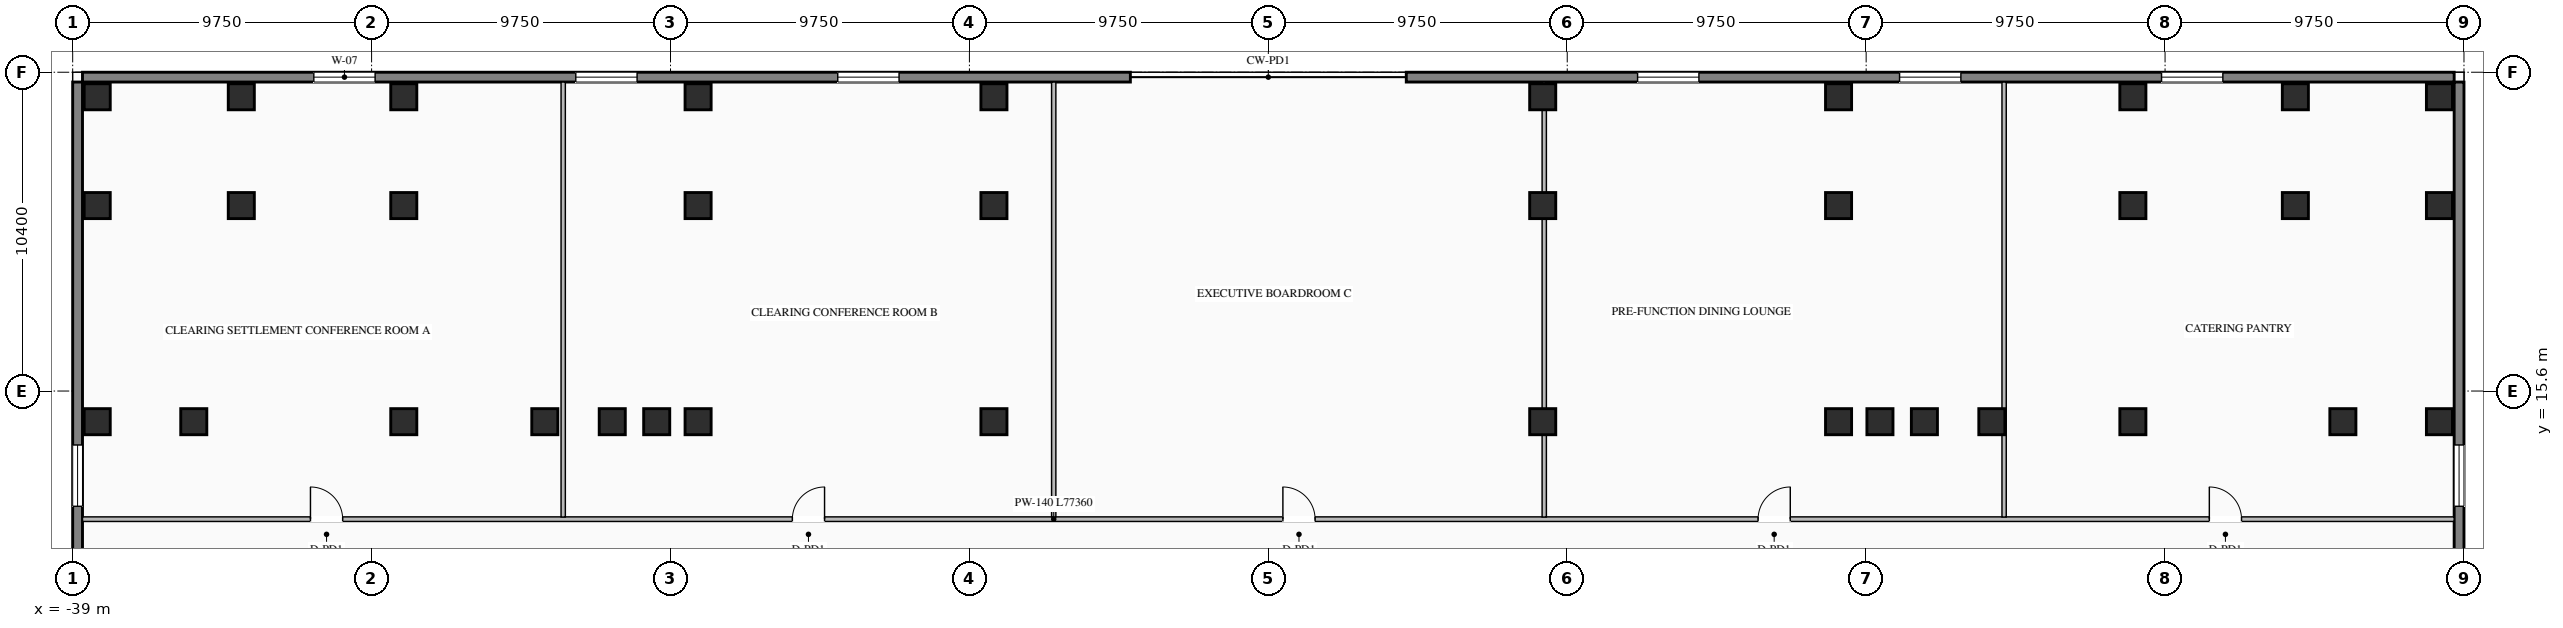
"""IFC4 building model, lengths in metres.
Left out: names, types, materials, properties, quantities, classifications, styles, units other than length and angle.
Written with IfcOpenShell. Run it as: python <this file> out.ifc"""

import sys

from ifc_helpers import new_model, si_unit, direction, frame, frame_2d, origin, origin_2d, place, context, subcontext, project, spatial, rectangle, i_section, extrude, element, fill, save


model = new_model("IFC4")
c1 = context("Model", 3, precision=1e-05, world=origin(), true_north=direction((0.0, 1.0)))
c2 = subcontext(c1, "Body", "Model", "MODEL_VIEW")
j1 = project(units=[si_unit("LENGTHUNIT", "METRE"), si_unit("PLANEANGLEUNIT", "RADIAN")], contexts=[c1])
p1 = place(None, origin())
s1 = spatial("IfcSite", under=j1, at=p1, CompositionType="ELEMENT")
p2 = place(p1, origin())
s2 = spatial("IfcBuilding", under=s1, at=p2, CompositionType="ELEMENT")
p3 = place(p2, frame((0.0, 0.0, 18.6)))
s3 = spatial("IfcBuildingStorey", under=s2, at=p3, CompositionType="ELEMENT", Elevation=18.6)
for number, where, z_axis, x_axis in (
    (1, (-21.4, 14.6, 0.0), (0.0, 0.0, 1.0), (1.0, 0.0, 0.0)),
    (2, (-19.95, 14.6, 0.0), (0.0, 0.0, 1.0), (1.0, 0.0, 0.0)),
    (3, (-18.6, 14.6, 0.0), (0.0, 0.0, 1.0), (1.0, 0.0, 0.0)),
    (4, (-8.95, 14.6, 0.0), (0.0, 0.0, 1.0), (1.0, 0.0, 0.0)),
    (5, (8.95, 14.6, 0.0), (0.0, 0.0, 1.0), (1.0, 0.0, 0.0)),
    (6, (18.6, 14.6, 0.0), (0.0, 0.0, 1.0), (1.0, 0.0, 0.0)),
    (7, (19.95, 14.6, 0.0), (0.0, 0.0, 1.0), (1.0, 0.0, 0.0)),
    (8, (21.4, 14.6, 0.0), (0.0, 0.0, 1.0), (1.0, 0.0, 0.0)),
    (9, (-23.6, 14.6, 0.0), (0.0, 0.0, 1.0), (1.0, 0.0, 0.0)),
    (10, (23.6, 14.6, 0.0), (0.0, 0.0, 1.0), (1.0, 0.0, 0.0)),
    (11, (-28.2, 14.6, 0.0), (0.0, 0.0, 1.0), (1.0, 0.0, 0.0)),
    (12, (28.2, 14.6, 0.0), (0.0, 0.0, 1.0), (1.0, 0.0, 0.0)),
    (13, (-35.05, 14.6, 0.0), (0.0, 0.0, 1.0), (1.0, 0.0, 0.0)),
    (14, (35.05, 14.6, 0.0), (0.0, 0.0, 1.0), (1.0, 0.0, 0.0)),
    (15, (-38.2, 21.65, 0.0), (0.0, 0.0, 1.0), (1.0, 0.0, 0.0)),
    (16, (-33.5, 21.65, 0.0), (0.0, 0.0, 1.0), (1.0, 0.0, 0.0)),
    (17, (-28.2, 21.65, 0.0), (0.0, 0.0, 1.0), (1.0, 0.0, 0.0)),
    (18, (-18.6, 21.65, 0.0), (0.0, 0.0, 1.0), (1.0, 0.0, 0.0)),
    (19, (-8.95, 21.65, 0.0), (0.0, 0.0, 1.0), (1.0, 0.0, 0.0)),
    (20, (8.95, 21.65, 0.0), (0.0, 0.0, 1.0), (1.0, 0.0, 0.0)),
    (21, (18.6, 21.65, 0.0), (0.0, 0.0, 1.0), (1.0, 0.0, 0.0)),
    (22, (28.2, 21.65, 0.0), (0.0, 0.0, 1.0), (1.0, 0.0, 0.0)),
    (23, (33.5, 21.65, 0.0), (0.0, 0.0, 1.0), (1.0, 0.0, 0.0)),
    (24, (38.2, 21.65, 0.0), (0.0, 0.0, 1.0), (1.0, 0.0, 0.0)),
    (25, (-38.2, 25.2, 0.0), (0.0, 0.0, 1.0), (1.0, 0.0, 0.0)),
    (26, (-33.5, 25.2, 0.0), (0.0, 0.0, 1.0), (1.0, 0.0, 0.0)),
    (27, (-28.2, 25.2, 0.0), (0.0, 0.0, 1.0), (1.0, 0.0, 0.0)),
    (28, (-18.6, 25.2, 0.0), (0.0, 0.0, 1.0), (1.0, 0.0, 0.0)),
    (29, (-8.95, 25.2, 0.0), (0.0, 0.0, 1.0), (1.0, 0.0, 0.0)),
    (30, (8.95, 25.2, 0.0), (0.0, 0.0, 1.0), (1.0, 0.0, 0.0)),
    (31, (18.6, 25.2, 0.0), (0.0, 0.0, 1.0), (1.0, 0.0, 0.0)),
    (32, (28.2, 25.2, 0.0), (0.0, 0.0, 1.0), (1.0, 0.0, 0.0)),
    (33, (33.5, 25.2, 0.0), (0.0, 0.0, 1.0), (1.0, 0.0, 0.0)),
    (34, (38.2, 25.2, 0.0), (0.0, 0.0, 1.0), (1.0, 0.0, 0.0)),
    (35, (-38.2, 14.6, 0.0), (0.0, 0.0, 1.0), (1.0, 0.0, 0.0)),
    (36, (38.2, 14.6, 0.0), (0.0, 0.0, 1.0), (1.0, 0.0, 0.0)),
):
    element("IfcColumn", number, at=place(p3, frame(where, z_axis=z_axis, x_axis=x_axis)), inside=s3, PredefinedType="COLUMN", context=c2, shape_type="SweptSolid", body=[
        extrude(i_section(OverallWidth=0.85, OverallDepth=0.85, WebThickness=0.032, FlangeThickness=0.048, at=origin_2d()), origin(), (0.0, 0.0, 1.0), 4.2),
    ])
p4 = place(p3, frame((-38.68, 25.84, 0.0), z_axis=(0.0, 0.0, 1.0), x_axis=(1.0, 0.0, 0.0)))
e37 = element("IfcWall", 37, at=p4, inside=s3, PredefinedType="STANDARD", context=c2, shape_type="SweptSolid", body=[
    extrude(rectangle(XDim=34.18, YDim=0.32, at=frame_2d((17.09, 0.0))), origin(), (0.0, 0.0, 1.0), 3.93),
])
p5 = place(p4, frame((7.545, 0.0, 0.8)))
e38 = element("IfcOpeningElement", 38, at=p5, cuts=e37, PredefinedType="OPENING", context=c2, shape_type="SweptSolid", body=[
    extrude(rectangle(XDim=2.0, YDim=2.2, at=frame_2d((1.0, 1.1))), frame((0.0, 0.17, 0.0), z_axis=(0.0, -1.0, 0.0), x_axis=(1.0, 0.0, 0.0)), (0.0, 0.0, 1.0), 0.34),
])
p6 = place(p4, frame((16.09, 0.0, 0.8)))
e39 = element("IfcOpeningElement", 39, at=p6, cuts=e37, PredefinedType="OPENING", context=c2, shape_type="SweptSolid", body=[
    extrude(rectangle(XDim=2.0, YDim=2.2, at=frame_2d((1.0, 1.1))), frame((0.0, 0.17, 0.0), z_axis=(0.0, -1.0, 0.0), x_axis=(1.0, 0.0, 0.0)), (0.0, 0.0, 1.0), 0.34),
])
p7 = place(p4, frame((24.635, 0.0, 0.8)))
e40 = element("IfcOpeningElement", 40, at=p7, cuts=e37, PredefinedType="OPENING", context=c2, shape_type="SweptSolid", body=[
    extrude(rectangle(XDim=2.0, YDim=2.2, at=frame_2d((1.0, 1.1))), frame((0.0, 0.17, 0.0), z_axis=(0.0, -1.0, 0.0), x_axis=(1.0, 0.0, 0.0)), (0.0, 0.0, 1.0), 0.34),
])
p8 = place(p3, frame((4.5, 25.84, 0.0), z_axis=(0.0, 0.0, 1.0), x_axis=(1.0, 0.0, 0.0)))
e41 = element("IfcWall", 41, at=p8, inside=s3, PredefinedType="STANDARD", context=c2, shape_type="SweptSolid", body=[
    extrude(rectangle(XDim=34.18, YDim=0.32, at=frame_2d((17.09, 0.0))), origin(), (0.0, 0.0, 1.0), 3.93),
])
p9 = place(p8, frame((7.545, 0.0, 0.8)))
e42 = element("IfcOpeningElement", 42, at=p9, cuts=e41, PredefinedType="OPENING", context=c2, shape_type="SweptSolid", body=[
    extrude(rectangle(XDim=2.0, YDim=2.2, at=frame_2d((1.0, 1.1))), frame((0.0, 0.17, 0.0), z_axis=(0.0, -1.0, 0.0), x_axis=(1.0, 0.0, 0.0)), (0.0, 0.0, 1.0), 0.34),
])
p10 = place(p8, frame((16.09, 0.0, 0.8)))
e43 = element("IfcOpeningElement", 43, at=p10, cuts=e41, PredefinedType="OPENING", context=c2, shape_type="SweptSolid", body=[
    extrude(rectangle(XDim=2.0, YDim=2.2, at=frame_2d((1.0, 1.1))), frame((0.0, 0.17, 0.0), z_axis=(0.0, -1.0, 0.0), x_axis=(1.0, 0.0, 0.0)), (0.0, 0.0, 1.0), 0.34),
])
p11 = place(p8, frame((24.635, 0.0, 0.8)))
e44 = element("IfcOpeningElement", 44, at=p11, cuts=e41, PredefinedType="OPENING", context=c2, shape_type="SweptSolid", body=[
    extrude(rectangle(XDim=2.0, YDim=2.2, at=frame_2d((1.0, 1.1))), frame((0.0, 0.17, 0.0), z_axis=(0.0, -1.0, 0.0), x_axis=(1.0, 0.0, 0.0)), (0.0, 0.0, 1.0), 0.34),
])
p12 = place(p3, frame((-38.84, -25.68, 0.0), z_axis=(0.0, 0.0, 1.0), x_axis=(0.0, 1.0, 0.0)))
e45 = element("IfcWall", 45, at=p12, inside=s3, PredefinedType="STANDARD", context=c2, shape_type="SweptSolid", body=[
    extrude(rectangle(XDim=51.36, YDim=0.32, at=frame_2d((25.68, 0.0))), origin(), (0.0, 0.0, 1.0), 3.93),
])
p13 = place(p12, frame((11.84, 0.0, 0.8)))
e46 = element("IfcOpeningElement", 46, at=p13, cuts=e45, PredefinedType="OPENING", context=c2, shape_type="SweptSolid", body=[
    extrude(rectangle(XDim=2.0, YDim=2.2, at=frame_2d((1.0, 1.1))), frame((0.0, 0.17, 0.0), z_axis=(0.0, -1.0, 0.0), x_axis=(1.0, 0.0, 0.0)), (0.0, 0.0, 1.0), 0.34),
])
p14 = place(p12, frame((24.68, 0.0, 0.8)))
e47 = element("IfcOpeningElement", 47, at=p14, cuts=e45, PredefinedType="OPENING", context=c2, shape_type="SweptSolid", body=[
    extrude(rectangle(XDim=2.0, YDim=2.2, at=frame_2d((1.0, 1.1))), frame((0.0, 0.17, 0.0), z_axis=(0.0, -1.0, 0.0), x_axis=(1.0, 0.0, 0.0)), (0.0, 0.0, 1.0), 0.34),
])
p15 = place(p12, frame((37.52, 0.0, 0.8)))
e48 = element("IfcOpeningElement", 48, at=p15, cuts=e45, PredefinedType="OPENING", context=c2, shape_type="SweptSolid", body=[
    extrude(rectangle(XDim=2.0, YDim=2.2, at=frame_2d((1.0, 1.1))), frame((0.0, 0.17, 0.0), z_axis=(0.0, -1.0, 0.0), x_axis=(1.0, 0.0, 0.0)), (0.0, 0.0, 1.0), 0.34),
])
p16 = place(p3, frame((38.84, 25.68, 0.0), z_axis=(0.0, 0.0, 1.0), x_axis=(0.0, -1.0, 0.0)))
e49 = element("IfcWall", 49, at=p16, inside=s3, PredefinedType="STANDARD", context=c2, shape_type="SweptSolid", body=[
    extrude(rectangle(XDim=51.36, YDim=0.32, at=frame_2d((25.68, 0.0))), origin(), (0.0, 0.0, 1.0), 3.93),
])
p17 = place(p16, frame((11.84, 0.0, 0.8)))
e50 = element("IfcOpeningElement", 50, at=p17, cuts=e49, PredefinedType="OPENING", context=c2, shape_type="SweptSolid", body=[
    extrude(rectangle(XDim=2.0, YDim=2.2, at=frame_2d((1.0, 1.1))), frame((0.0, 0.17, 0.0), z_axis=(0.0, -1.0, 0.0), x_axis=(1.0, 0.0, 0.0)), (0.0, 0.0, 1.0), 0.34),
])
p18 = place(p16, frame((24.68, 0.0, 0.8)))
e51 = element("IfcOpeningElement", 51, at=p18, cuts=e49, PredefinedType="OPENING", context=c2, shape_type="SweptSolid", body=[
    extrude(rectangle(XDim=2.0, YDim=2.2, at=frame_2d((1.0, 1.1))), frame((0.0, 0.17, 0.0), z_axis=(0.0, -1.0, 0.0), x_axis=(1.0, 0.0, 0.0)), (0.0, 0.0, 1.0), 0.34),
])
p19 = place(p16, frame((37.52, 0.0, 0.8)))
e52 = element("IfcOpeningElement", 52, at=p19, cuts=e49, PredefinedType="OPENING", context=c2, shape_type="SweptSolid", body=[
    extrude(rectangle(XDim=2.0, YDim=2.2, at=frame_2d((1.0, 1.1))), frame((0.0, 0.17, 0.0), z_axis=(0.0, -1.0, 0.0), x_axis=(1.0, 0.0, 0.0)), (0.0, 0.0, 1.0), 0.34),
])
p20 = place(p3, frame((-38.68, 11.42, 0.0), z_axis=(0.0, 0.0, 1.0), x_axis=(1.0, 0.0, 0.0)))
e53 = element("IfcWall", 53, at=p20, inside=s3, PredefinedType="STANDARD", context=c2, shape_type="SweptSolid", body=[
    extrude(rectangle(XDim=77.36, YDim=0.15, at=frame_2d((38.68, 0.0))), origin(), (0.0, 0.0, 1.0), 3.93),
])
p21 = place(p20, frame((7.436, 0.0, 0.0)))
e54 = element("IfcOpeningElement", 54, at=p21, cuts=e53, PredefinedType="OPENING", context=c2, shape_type="SweptSolid", body=[
    extrude(rectangle(XDim=1.05, YDim=2.08, at=frame_2d((0.525, 1.04))), frame((0.0, 0.085, 0.0), z_axis=(0.0, -1.0, 0.0), x_axis=(1.0, 0.0, 0.0)), (0.0, 0.0, 1.0), 0.17),
])
p22 = place(p20, frame((23.155, 0.0, 0.0)))
e55 = element("IfcOpeningElement", 55, at=p22, cuts=e53, PredefinedType="OPENING", context=c2, shape_type="SweptSolid", body=[
    extrude(rectangle(XDim=1.05, YDim=2.08, at=frame_2d((0.525, 1.04))), frame((0.0, 0.085, 0.0), z_axis=(0.0, -1.0, 0.0), x_axis=(1.0, 0.0, 0.0)), (0.0, 0.0, 1.0), 0.17),
])
p23 = place(p20, frame((39.155, 0.0, 0.0)))
e56 = element("IfcOpeningElement", 56, at=p23, cuts=e53, PredefinedType="OPENING", context=c2, shape_type="SweptSolid", body=[
    extrude(rectangle(XDim=1.05, YDim=2.08, at=frame_2d((0.525, 1.04))), frame((0.0, 0.085, 0.0), z_axis=(0.0, -1.0, 0.0), x_axis=(1.0, 0.0, 0.0)), (0.0, 0.0, 1.0), 0.17),
])
p24 = place(p20, frame((54.655, 0.0, 0.0)))
e57 = element("IfcOpeningElement", 57, at=p24, cuts=e53, PredefinedType="OPENING", context=c2, shape_type="SweptSolid", body=[
    extrude(rectangle(XDim=1.05, YDim=2.08, at=frame_2d((0.525, 1.04))), frame((0.0, 0.085, 0.0), z_axis=(0.0, -1.0, 0.0), x_axis=(1.0, 0.0, 0.0)), (0.0, 0.0, 1.0), 0.17),
])
p25 = place(p20, frame((69.374, 0.0, 0.0)))
e58 = element("IfcOpeningElement", 58, at=p25, cuts=e53, PredefinedType="OPENING", context=c2, shape_type="SweptSolid", body=[
    extrude(rectangle(XDim=1.05, YDim=2.08, at=frame_2d((0.525, 1.04))), frame((0.0, 0.085, 0.0), z_axis=(0.0, -1.0, 0.0), x_axis=(1.0, 0.0, 0.0)), (0.0, 0.0, 1.0), 0.17),
])
for number, where, z_axis, x_axis in (
    (59, (-23.0, 11.49, 0.0), (0.0, 0.0, 1.0), (0.0, 1.0, 0.0)),
    (60, (-7.0, 11.49, 0.0), (0.0, 0.0, 1.0), (0.0, 1.0, 0.0)),
):
    element("IfcWall", number, at=place(p3, frame(where, z_axis=z_axis, x_axis=x_axis)), inside=s3, PredefinedType="STANDARD", context=c2, shape_type="SweptSolid", body=[
        extrude(rectangle(XDim=14.19, YDim=0.14, at=frame_2d((7.095, 0.0))), origin(), (0.0, 0.0, 1.0), 3.93),
    ])
p26 = place(p3, frame((9.0, 11.49, 0.0), z_axis=(0.0, 0.0, 1.0), x_axis=(0.0, 1.0, 0.0)))
e61 = element("IfcWall", 61, at=p26, inside=s3, PredefinedType="STANDARD", context=c2, shape_type="SweptSolid", body=[
    extrude(rectangle(XDim=14.19, YDim=0.14, at=frame_2d((7.095, 0.0))), origin(), (0.0, 0.0, 1.0), 3.225),
])
p27 = place(p3, frame((24.0, 11.49, 0.0), z_axis=(0.0, 0.0, 1.0), x_axis=(0.0, 1.0, 0.0)))
e62 = element("IfcWall", 62, at=p27, inside=s3, PredefinedType="STANDARD", context=c2, shape_type="SweptSolid", body=[
    extrude(rectangle(XDim=14.19, YDim=0.14, at=frame_2d((7.095, 0.0))), origin(), (0.0, 0.0, 1.0), 3.93),
])
p28 = place(p5, origin())
e63 = element("IfcWindow", 63, at=p28, inside=s3, PartitioningType="DOUBLE_PANEL_VERTICAL", PredefinedType="WINDOW", context=c2, shape_type="SweptSolid", body=[
    extrude(rectangle(XDim=2.0, YDim=2.2, at=frame_2d((1.0, 1.1))), frame((0.0, 0.03, 0.0), z_axis=(0.0, -1.0, 0.0), x_axis=(1.0, 0.0, 0.0)), (0.0, 0.0, 1.0), 0.06),
])
fill(e38, e63)
p29 = place(p6, origin())
e64 = element("IfcWindow", 64, at=p29, inside=s3, PartitioningType="DOUBLE_PANEL_VERTICAL", PredefinedType="WINDOW", context=c2, shape_type="SweptSolid", body=[
    extrude(rectangle(XDim=2.0, YDim=2.2, at=frame_2d((1.0, 1.1))), frame((0.0, 0.03, 0.0), z_axis=(0.0, -1.0, 0.0), x_axis=(1.0, 0.0, 0.0)), (0.0, 0.0, 1.0), 0.06),
])
fill(e39, e64)
p30 = place(p7, origin())
e65 = element("IfcWindow", 65, at=p30, inside=s3, PartitioningType="DOUBLE_PANEL_VERTICAL", PredefinedType="WINDOW", context=c2, shape_type="SweptSolid", body=[
    extrude(rectangle(XDim=2.0, YDim=2.2, at=frame_2d((1.0, 1.1))), frame((0.0, 0.03, 0.0), z_axis=(0.0, -1.0, 0.0), x_axis=(1.0, 0.0, 0.0)), (0.0, 0.0, 1.0), 0.06),
])
fill(e40, e65)
p31 = place(p9, origin())
e66 = element("IfcWindow", 66, at=p31, inside=s3, PartitioningType="DOUBLE_PANEL_VERTICAL", PredefinedType="WINDOW", context=c2, shape_type="SweptSolid", body=[
    extrude(rectangle(XDim=2.0, YDim=2.2, at=frame_2d((1.0, 1.1))), frame((0.0, 0.03, 0.0), z_axis=(0.0, -1.0, 0.0), x_axis=(1.0, 0.0, 0.0)), (0.0, 0.0, 1.0), 0.06),
])
fill(e42, e66)
p32 = place(p10, origin())
e67 = element("IfcWindow", 67, at=p32, inside=s3, PartitioningType="DOUBLE_PANEL_VERTICAL", PredefinedType="WINDOW", context=c2, shape_type="SweptSolid", body=[
    extrude(rectangle(XDim=2.0, YDim=2.2, at=frame_2d((1.0, 1.1))), frame((0.0, 0.03, 0.0), z_axis=(0.0, -1.0, 0.0), x_axis=(1.0, 0.0, 0.0)), (0.0, 0.0, 1.0), 0.06),
])
fill(e43, e67)
p33 = place(p11, origin())
e68 = element("IfcWindow", 68, at=p33, inside=s3, PartitioningType="DOUBLE_PANEL_VERTICAL", PredefinedType="WINDOW", context=c2, shape_type="SweptSolid", body=[
    extrude(rectangle(XDim=2.0, YDim=2.2, at=frame_2d((1.0, 1.1))), frame((0.0, 0.03, 0.0), z_axis=(0.0, -1.0, 0.0), x_axis=(1.0, 0.0, 0.0)), (0.0, 0.0, 1.0), 0.06),
])
fill(e44, e68)
p34 = place(p15, origin())
e69 = element("IfcWindow", 69, at=p34, inside=s3, PartitioningType="DOUBLE_PANEL_VERTICAL", PredefinedType="WINDOW", context=c2, shape_type="SweptSolid", body=[
    extrude(rectangle(XDim=2.0, YDim=2.2, at=frame_2d((1.0, 1.1))), frame((0.0, 0.03, 0.0), z_axis=(0.0, -1.0, 0.0), x_axis=(1.0, 0.0, 0.0)), (0.0, 0.0, 1.0), 0.06),
])
fill(e48, e69)
p35 = place(p17, origin())
e70 = element("IfcWindow", 70, at=p35, inside=s3, PartitioningType="DOUBLE_PANEL_VERTICAL", PredefinedType="WINDOW", context=c2, shape_type="SweptSolid", body=[
    extrude(rectangle(XDim=2.0, YDim=2.2, at=frame_2d((1.0, 1.1))), frame((0.0, 0.03, 0.0), z_axis=(0.0, -1.0, 0.0), x_axis=(1.0, 0.0, 0.0)), (0.0, 0.0, 1.0), 0.06),
])
fill(e50, e70)
p36 = place(p21, origin())
e71 = element("IfcDoor", 71, at=p36, inside=s3, OperationType="SINGLE_SWING_LEFT", PredefinedType="DOOR", context=c2, shape_type="SweptSolid", body=[
    extrude(rectangle(XDim=1.05, YDim=2.08, at=frame_2d((0.525, 1.04))), frame((0.0, 0.025, 0.0), z_axis=(0.0, -1.0, 0.0), x_axis=(1.0, 0.0, 0.0)), (0.0, 0.0, 1.0), 0.05),
])
fill(e54, e71)
p37 = place(p22, origin())
e72 = element("IfcDoor", 72, at=p37, inside=s3, OperationType="SINGLE_SWING_RIGHT", PredefinedType="DOOR", context=c2, shape_type="SweptSolid", body=[
    extrude(rectangle(XDim=1.05, YDim=2.08, at=frame_2d((0.525, 1.04))), frame((0.0, 0.025, 0.0), z_axis=(0.0, -1.0, 0.0), x_axis=(1.0, 0.0, 0.0)), (0.0, 0.0, 1.0), 0.05),
])
fill(e55, e72)
p38 = place(p23, origin())
e73 = element("IfcDoor", 73, at=p38, inside=s3, OperationType="SINGLE_SWING_LEFT", PredefinedType="DOOR", context=c2, shape_type="SweptSolid", body=[
    extrude(rectangle(XDim=1.05, YDim=2.08, at=frame_2d((0.525, 1.04))), frame((0.0, 0.025, 0.0), z_axis=(0.0, -1.0, 0.0), x_axis=(1.0, 0.0, 0.0)), (0.0, 0.0, 1.0), 0.05),
])
fill(e56, e73)
p39 = place(p24, origin())
e74 = element("IfcDoor", 74, at=p39, inside=s3, OperationType="SINGLE_SWING_RIGHT", PredefinedType="DOOR", context=c2, shape_type="SweptSolid", body=[
    extrude(rectangle(XDim=1.05, YDim=2.08, at=frame_2d((0.525, 1.04))), frame((0.0, 0.025, 0.0), z_axis=(0.0, -1.0, 0.0), x_axis=(1.0, 0.0, 0.0)), (0.0, 0.0, 1.0), 0.05),
])
fill(e57, e74)
p40 = place(p25, origin())
e75 = element("IfcDoor", 75, at=p40, inside=s3, OperationType="SINGLE_SWING_LEFT", PredefinedType="DOOR", context=c2, shape_type="SweptSolid", body=[
    extrude(rectangle(XDim=1.05, YDim=2.08, at=frame_2d((0.525, 1.04))), frame((0.0, 0.025, 0.0), z_axis=(0.0, -1.0, 0.0), x_axis=(1.0, 0.0, 0.0)), (0.0, 0.0, 1.0), 0.05),
])
fill(e58, e75)
save(model, sys.argv[1])
